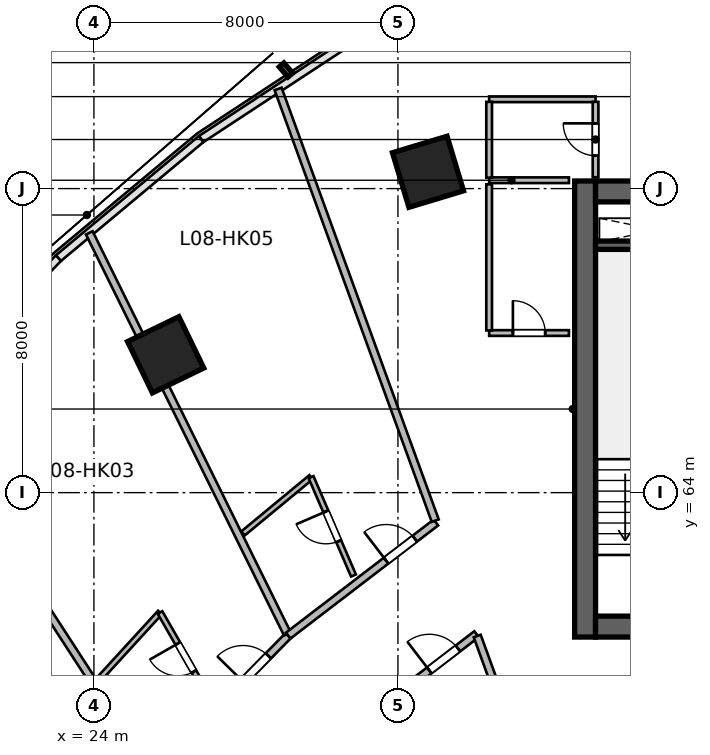
"""IFC4 building model, lengths in metres.
Left out: names, types, materials, properties, quantities, classifications, styles, units other than length and angle.
Written with IfcOpenShell. Run it as: python <this file> out.ifc"""

import sys

from ifc_helpers import new_model, si_unit, direction, frame, frame_2d, origin, origin_2d, place, context, subcontext, project, spatial, rectangle, extrude, source, transform, mapped, element, fill, save


model = new_model("IFC4")
c1 = context("Model", 3, precision=1e-05, world=origin(), true_north=direction((0.0, 1.0)))
c2 = subcontext(c1, "Body", "Model", "MODEL_VIEW")
j1 = project(units=[si_unit("LENGTHUNIT", "METRE"), si_unit("PLANEANGLEUNIT", "RADIAN")], contexts=[c1])
p1 = place(None, origin())
s1 = spatial("IfcSite", under=j1, at=p1, CompositionType="ELEMENT")
p2 = place(p1, origin())
s2 = spatial("IfcBuilding", under=s1, at=p2, CompositionType="ELEMENT")
p3 = place(p2, frame((0.0, 0.0, 42.6)))
s3 = spatial("IfcBuildingStorey", under=s2, at=p3, CompositionType="ELEMENT", Elevation=42.6)
m1 = source(origin(), c2, "Body", "SweptSolid", [
    extrude(rectangle(XDim=12.0, YDim=0.55, at=frame_2d((6.0, 0.0))), origin(), (0.0, 0.0, 1.0), 3.6),
])
p4 = place(p3, frame((36.925, 60.2, 0.0), z_axis=(0.0, 0.0, 1.0), x_axis=(0.0, 1.0, 0.0)))
e1 = element("IfcWall", 1, at=p4, inside=s3, PredefinedType="SHEAR", context=c2, shape_type="MappedRepresentation", body=[
    mapped(m1, transform((0.0, 0.0, 0.0), scale=1.0)),
])
m2 = source(origin(), c2, "Body", "SweptSolid", [
    extrude(rectangle(XDim=21.6, YDim=0.55, at=frame_2d((10.8, 0.0))), origin(), (0.0, 0.0, 1.0), 3.6),
])
p5 = place(p3, frame((37.2, 60.475, 0.0), z_axis=(0.0, 0.0, 1.0), x_axis=(1.0, 0.0, 0.0)))
e2 = element("IfcWall", 2, at=p5, inside=s3, PredefinedType="SHEAR", context=c2, shape_type="MappedRepresentation", body=[
    mapped(m2, transform((0.0, 0.0, 0.0), scale=1.0)),
])
p6 = place(p5, frame((1.1, 0.0, 0.0)))
e3 = element("IfcOpeningElement", 3, at=p6, cuts=e2, PredefinedType="OPENING", context=c2, shape_type="SweptSolid", body=[
    extrude(rectangle(XDim=1.15, YDim=2.15, at=frame_2d((0.575, 1.075))), frame((0.0, 0.285, 0.0), z_axis=(0.0, -1.0, 0.0), x_axis=(1.0, 0.0, 0.0)), (0.0, 0.0, 1.0), 0.57),
])
p7 = place(p5, frame((19.5, 0.0, 0.0)))
e4 = element("IfcOpeningElement", 4, at=p7, cuts=e2, PredefinedType="OPENING", context=c2, shape_type="SweptSolid", body=[
    extrude(rectangle(XDim=0.9, YDim=2.1, at=frame_2d((0.45, 1.05))), frame((0.0, 0.285, 0.0), z_axis=(0.0, -1.0, 0.0), x_axis=(1.0, 0.0, 0.0)), (0.0, 0.0, 1.0), 0.57),
])
p8 = place(p5, frame((12.02, 0.0, 0.0)))
e5 = element("IfcOpeningElement", 5, at=p8, cuts=e2, PredefinedType="OPENING", context=c2, shape_type="SweptSolid", body=[
    extrude(rectangle(XDim=1.6, YDim=2.15, at=frame_2d((0.8, 1.075))), frame((0.0, 0.285, 0.0), z_axis=(0.0, -1.0, 0.0), x_axis=(1.0, 0.0, 0.0)), (0.0, 0.0, 1.0), 0.57),
])
p9 = place(p3, frame((37.2, 71.925, 0.0), z_axis=(0.0, 0.0, 1.0), x_axis=(1.0, 0.0, 0.0)))
e6 = element("IfcWall", 6, at=p9, inside=s3, PredefinedType="SHEAR", context=c2, shape_type="MappedRepresentation", body=[
    mapped(m2, transform((0.0, 0.0, 0.0), scale=1.0)),
])
p10 = place(p9, frame((1.2, 0.0, 0.0)))
e7 = element("IfcOpeningElement", 7, at=p10, cuts=e6, PredefinedType="OPENING", context=c2, shape_type="SweptSolid", body=[
    extrude(rectangle(XDim=0.9, YDim=2.1, at=frame_2d((0.45, 1.05))), frame((0.0, 0.285, 0.0), z_axis=(0.0, -1.0, 0.0), x_axis=(1.0, 0.0, 0.0)), (0.0, 0.0, 1.0), 0.57),
])
p11 = place(p9, frame((14.7, 0.0, 0.0)))
e8 = element("IfcOpeningElement", 8, at=p11, cuts=e6, PredefinedType="OPENING", context=c2, shape_type="SweptSolid", body=[
    extrude(rectangle(XDim=1.2, YDim=2.15, at=frame_2d((0.6, 1.075))), frame((0.0, 0.285, 0.0), z_axis=(0.0, -1.0, 0.0), x_axis=(1.0, 0.0, 0.0)), (0.0, 0.0, 1.0), 0.57),
])
p12 = place(p9, frame((4.15, 0.0, 0.0)))
e9 = element("IfcOpeningElement", 9, at=p12, cuts=e6, PredefinedType="OPENING", context=c2, shape_type="SweptSolid", body=[
    extrude(rectangle(XDim=1.3, YDim=2.15, at=frame_2d((0.65, 1.075))), frame((0.0, 0.285, 0.0), z_axis=(0.0, -1.0, 0.0), x_axis=(1.0, 0.0, 0.0)), (0.0, 0.0, 1.0), 0.57),
])
p13 = place(p9, frame((7.25, 0.0, 0.0)))
e10 = element("IfcOpeningElement", 10, at=p13, cuts=e6, PredefinedType="OPENING", context=c2, shape_type="SweptSolid", body=[
    extrude(rectangle(XDim=0.9, YDim=2.1, at=frame_2d((0.45, 1.05))), frame((0.0, 0.285, 0.0), z_axis=(0.0, -1.0, 0.0), x_axis=(1.0, 0.0, 0.0)), (0.0, 0.0, 1.0), 0.57),
])
p14 = place(p9, frame((10.95, 0.0, 0.0)))
e11 = element("IfcOpeningElement", 11, at=p14, cuts=e6, PredefinedType="OPENING", context=c2, shape_type="SweptSolid", body=[
    extrude(rectangle(XDim=0.9, YDim=2.1, at=frame_2d((0.45, 1.05))), frame((0.0, 0.285, 0.0), z_axis=(0.0, -1.0, 0.0), x_axis=(1.0, 0.0, 0.0)), (0.0, 0.0, 1.0), 0.57),
])
m3 = source(origin(), c2, "Body", "SweptSolid", [
    extrude(rectangle(XDim=3.27, YDim=0.22, at=frame_2d((1.635, 0.0))), origin(), (0.0, 0.0, 1.0), 3.6),
])
p15 = place(p3, frame((37.2, 70.51, 0.0), z_axis=(0.0, 0.0, 1.0), x_axis=(1.0, 0.0, 0.0)))
e12 = element("IfcWall", 12, at=p15, inside=s3, PredefinedType="SHEAR", context=c2, shape_type="MappedRepresentation", body=[
    mapped(m3, transform((0.0, 0.0, 0.0), scale=1.0)),
])
m4 = source(origin(), c2, "Body", "SweptSolid", [
    extrude(rectangle(XDim=1.5, YDim=1.5, at=origin_2d()), origin(), (0.0, 0.0, 1.0), 3.6),
])
for number, where, z_axis, x_axis in (
    (13, (25.888, 67.627, 0.0), (0.0, 0.0, 1.0), (-0.436, 0.9, 0.0)),
    (14, (32.791, 72.442, 0.0), (0.0, 0.0, 1.0), (-0.289, 0.957, 0.0)),
):
    element("IfcColumn", number, at=place(p3, frame(where, z_axis=z_axis, x_axis=x_axis)), inside=s3, PredefinedType="COLUMN", context=c2, shape_type="MappedRepresentation", body=[
        mapped(m4, transform((0.0, 0.0, 0.0), scale=1.0)),
    ])
m5 = source(origin(), c2, "Body", "SweptSolid", [
    extrude(rectangle(XDim=2.1, YDim=0.15, at=frame_2d((1.05, 0.0))), origin(), (0.0, 0.0, 1.0), 3.36),
])
p16 = place(p3, frame((34.4, 72.22, 0.0), z_axis=(0.0, 0.0, 1.0), x_axis=(1.0, 0.0, 0.0)))
e15 = element("IfcWall", 15, at=p16, inside=s3, PredefinedType="PARTITIONING", context=c2, shape_type="MappedRepresentation", body=[
    mapped(m5, transform((0.0, 0.0, 0.0), scale=1.0)),
])
m6 = source(origin(), c2, "Body", "SweptSolid", [
    extrude(rectangle(XDim=2.8, YDim=0.15, at=frame_2d((1.4, 0.0))), origin(), (0.0, 0.0, 1.0), 3.36),
])
p17 = place(p3, frame((34.4, 74.35, 0.0), z_axis=(0.0, 0.0, 1.0), x_axis=(1.0, 0.0, 0.0)))
e16 = element("IfcWall", 16, at=p17, inside=s3, PredefinedType="PARTITIONING", context=c2, shape_type="MappedRepresentation", body=[
    mapped(m6, transform((0.0, 0.0, 0.0), scale=1.0)),
])
m7 = source(origin(), c2, "Body", "SweptSolid", [
    extrude(rectangle(XDim=1.995, YDim=0.15, at=frame_2d((0.998, 0.0))), origin(), (0.0, 0.0, 1.0), 3.36),
])
p18 = place(p3, frame((34.4, 72.288, 0.0), z_axis=(0.0, 0.0, 1.0), x_axis=(0.0, 1.0, 0.0)))
e17 = element("IfcWall", 17, at=p18, inside=s3, PredefinedType="PARTITIONING", context=c2, shape_type="MappedRepresentation", body=[
    mapped(m7, transform((0.0, 0.0, 0.0), scale=1.0)),
])
m8 = source(origin(), c2, "Body", "SweptSolid", [
    extrude(rectangle(XDim=1.982, YDim=0.15, at=frame_2d((0.991, 0.0))), origin(), (0.0, 0.0, 1.0), 3.36),
])
p19 = place(p3, frame((37.2, 72.3, 0.0), z_axis=(0.0, 0.0, 1.0), x_axis=(0.0, 1.0, 0.0)))
e18 = element("IfcWall", 18, at=p19, inside=s3, PredefinedType="PARTITIONING", context=c2, shape_type="MappedRepresentation", body=[
    mapped(m8, transform((0.0, 0.0, 0.0), scale=1.0)),
])
p20 = place(p19, frame((0.566, 0.0, 0.0)))
e19 = element("IfcOpeningElement", 19, at=p20, cuts=e18, PredefinedType="OPENING", context=c2, shape_type="SweptSolid", body=[
    extrude(rectangle(XDim=0.85, YDim=2.1, at=frame_2d((0.425, 1.05))), frame((0.0, 0.085, 0.0), z_axis=(0.0, -1.0, 0.0), x_axis=(1.0, 0.0, 0.0)), (0.0, 0.0, 1.0), 0.17),
])
p21 = place(p3, frame((34.4, 68.2, 0.0), z_axis=(0.0, 0.0, 1.0), x_axis=(1.0, 0.0, 0.0)))
e20 = element("IfcWall", 20, at=p21, inside=s3, PredefinedType="PARTITIONING", context=c2, shape_type="MappedRepresentation", body=[
    mapped(m5, transform((0.0, 0.0, 0.0), scale=1.0)),
])
p22 = place(p21, frame((0.625, 0.0, 0.0)))
e21 = element("IfcOpeningElement", 21, at=p22, cuts=e20, PredefinedType="OPENING", context=c2, shape_type="SweptSolid", body=[
    extrude(rectangle(XDim=0.85, YDim=2.1, at=frame_2d((0.425, 1.05))), frame((0.0, 0.085, 0.0), z_axis=(0.0, -1.0, 0.0), x_axis=(1.0, 0.0, 0.0)), (0.0, 0.0, 1.0), 0.17),
])
m9 = source(origin(), c2, "Body", "SweptSolid", [
    extrude(rectangle(XDim=3.845, YDim=0.15, at=frame_2d((1.922, 0.0))), origin(), (0.0, 0.0, 1.0), 3.36),
])
p23 = place(p3, frame((34.4, 68.268, 0.0), z_axis=(0.0, 0.0, 1.0), x_axis=(0.0, 1.0, 0.0)))
e22 = element("IfcWall", 22, at=p23, inside=s3, PredefinedType="PARTITIONING", context=c2, shape_type="MappedRepresentation", body=[
    mapped(m9, transform((0.0, 0.0, 0.0), scale=1.0)),
])
m10 = source(origin(), c2, "Body", "SweptSolid", [
    extrude(rectangle(XDim=11.403, YDim=0.195, at=frame_2d((5.701, 0.0))), origin(), (0.0, 0.0, 1.0), 3.36),
])
p24 = place(p3, frame((25.523, 56.647, 0.0), z_axis=(0.0, 0.0, 1.0), x_axis=(-0.544246090008, 0.838925618581, 0.0)))
e23 = element("IfcWall", 23, at=p24, inside=s3, PredefinedType="PARTITIONING", context=c2, shape_type="MappedRepresentation", body=[
    mapped(m10, transform((0.0, 0.0, 0.0), scale=1.0)),
])
m11 = source(origin(), c2, "Body", "SweptSolid", [
    extrude(rectangle(XDim=5.087, YDim=0.195, at=frame_2d((2.543, 0.0))), origin(), (0.0, 0.0, 1.0), 3.36),
])
p25 = place(p3, frame((25.55, 56.607, 0.0), z_axis=(0.0, 0.0, 1.0), x_axis=(0.700428330775, 0.7137227427, 0.0)))
e24 = element("IfcWall", 24, at=p25, inside=s3, PredefinedType="PARTITIONING", context=c2, shape_type="MappedRepresentation", body=[
    mapped(m11, transform((0.0, 0.0, 0.0), scale=1.0)),
])
p26 = place(p25, frame((3.391, 0.0, 0.0)))
e25 = element("IfcOpeningElement", 25, at=p26, cuts=e24, PredefinedType="OPENING", context=c2, shape_type="SweptSolid", body=[
    extrude(rectangle(XDim=0.95, YDim=2.15, at=frame_2d((0.475, 1.075))), frame((0.0, 0.107, 0.0), z_axis=(0.0, -1.0, 0.0), x_axis=(1.0, 0.0, 0.0)), (0.0, 0.0, 1.0), 0.215),
])
m12 = source(origin(), c2, "Body", "SweptSolid", [
    extrude(rectangle(XDim=11.77, YDim=0.195, at=frame_2d((5.885, 0.0))), origin(), (0.0, 0.0, 1.0), 3.36),
])
p27 = place(p3, frame((29.091, 60.282, 0.0), z_axis=(0.0, 0.0, 1.0), x_axis=(-0.44286060326, 0.896590478468, 0.0)))
e26 = element("IfcWall", 26, at=p27, inside=s3, PredefinedType="PARTITIONING", context=c2, shape_type="MappedRepresentation", body=[
    mapped(m12, transform((0.0, 0.0, 0.0), scale=1.0)),
])
m13 = source(origin(), c2, "Body", "SweptSolid", [
    extrude(rectangle(XDim=2.416, YDim=0.14, at=frame_2d((1.208, 0.0))), origin(), (0.0, 0.0, 1.0), 3.36),
])
p28 = place(p3, frame((24.108, 59.064, 0.0), z_axis=(0.0, 0.0, 1.0), x_axis=(0.675399637907, 0.737451916476, 0.0)))
e27 = element("IfcWall", 27, at=p28, inside=s3, PredefinedType="PARTITIONING", context=c2, shape_type="MappedRepresentation", body=[
    mapped(m13, transform((0.0, 0.0, 0.0), scale=1.0)),
])
m14 = source(origin(), c2, "Body", "SweptSolid", [
    extrude(rectangle(XDim=2.732, YDim=0.14, at=frame_2d((1.366, 0.0))), origin(), (0.0, 0.0, 1.0), 3.36),
])
p29 = place(p3, frame((27.098, 58.476, 0.0), z_axis=(0.0, 0.0, 1.0), x_axis=(-0.497254966372, 0.867604459658, 0.0)))
e28 = element("IfcWall", 28, at=p29, inside=s3, PredefinedType="PARTITIONING", context=c2, shape_type="MappedRepresentation", body=[
    mapped(m14, transform((0.0, 0.0, 0.0), scale=1.0)),
])
p30 = place(p29, frame((0.941, 0.0, 0.0)))
e29 = element("IfcOpeningElement", 29, at=p30, cuts=e28, PredefinedType="OPENING", context=c2, shape_type="SweptSolid", body=[
    extrude(rectangle(XDim=0.85, YDim=2.05, at=frame_2d((0.425, 1.025))), frame((0.0, 0.08, 0.0), z_axis=(0.0, -1.0, 0.0), x_axis=(1.0, 0.0, 0.0)), (0.0, 0.0, 1.0), 0.16),
])
m15 = source(origin(), c2, "Body", "SweptSolid", [
    extrude(rectangle(XDim=4.895, YDim=0.195, at=frame_2d((2.447, 0.0))), origin(), (0.0, 0.0, 1.0), 3.36),
])
p31 = place(p3, frame((29.113, 60.238, 0.0), z_axis=(0.0, 0.0, 1.0), x_axis=(0.793896075849, 0.608053468661, 0.0)))
e30 = element("IfcWall", 30, at=p31, inside=s3, PredefinedType="PARTITIONING", context=c2, shape_type="MappedRepresentation", body=[
    mapped(m15, transform((0.0, 0.0, 0.0), scale=1.0)),
])
p32 = place(p31, frame((3.245, 0.0, 0.0)))
e31 = element("IfcOpeningElement", 31, at=p32, cuts=e30, PredefinedType="OPENING", context=c2, shape_type="SweptSolid", body=[
    extrude(rectangle(XDim=0.95, YDim=2.15, at=frame_2d((0.475, 1.075))), frame((0.0, 0.107, 0.0), z_axis=(0.0, -1.0, 0.0), x_axis=(1.0, 0.0, 0.0)), (0.0, 0.0, 1.0), 0.215),
])
m16 = source(origin(), c2, "Body", "SweptSolid", [
    extrude(rectangle(XDim=12.088, YDim=0.195, at=frame_2d((6.044, 0.0))), origin(), (0.0, 0.0, 1.0), 3.36),
])
p33 = place(p3, frame((32.981, 63.262, 0.0), z_axis=(0.0, 0.0, 1.0), x_axis=(-0.34203007529, 0.939689005787, 0.0)))
e32 = element("IfcWall", 32, at=p33, inside=s3, PredefinedType="PARTITIONING", context=c2, shape_type="MappedRepresentation", body=[
    mapped(m16, transform((0.0, 0.0, 0.0), scale=1.0)),
])
m17 = source(origin(), c2, "Body", "SweptSolid", [
    extrude(rectangle(XDim=2.324, YDim=0.14, at=frame_2d((1.162, 0.0))), origin(), (0.0, 0.0, 1.0), 3.36),
])
p34 = place(p3, frame((27.923, 62.926, 0.0), z_axis=(0.0, 0.0, 1.0), x_axis=(0.770746444956, 0.637141991701, 0.0)))
e33 = element("IfcWall", 33, at=p34, inside=s3, PredefinedType="PARTITIONING", context=c2, shape_type="MappedRepresentation", body=[
    mapped(m17, transform((0.0, 0.0, 0.0), scale=1.0)),
])
m18 = source(origin(), c2, "Body", "SweptSolid", [
    extrude(rectangle(XDim=2.818, YDim=0.14, at=frame_2d((1.409, 0.0))), origin(), (0.0, 0.0, 1.0), 3.36),
])
p35 = place(p3, frame((30.83, 61.819, 0.0), z_axis=(0.0, 0.0, 1.0), x_axis=(-0.395894859341, 0.918295845764, 0.0)))
e34 = element("IfcWall", 34, at=p35, inside=s3, PredefinedType="PARTITIONING", context=c2, shape_type="MappedRepresentation", body=[
    mapped(m18, transform((0.0, 0.0, 0.0), scale=1.0)),
])
p36 = place(p35, frame((0.984, 0.0, 0.0)))
e35 = element("IfcOpeningElement", 35, at=p36, cuts=e34, PredefinedType="OPENING", context=c2, shape_type="SweptSolid", body=[
    extrude(rectangle(XDim=0.85, YDim=2.05, at=frame_2d((0.425, 1.025))), frame((0.0, 0.08, 0.0), z_axis=(0.0, -1.0, 0.0), x_axis=(1.0, 0.0, 0.0)), (0.0, 0.0, 1.0), 0.16),
])
m19 = source(origin(), c2, "Body", "SweptSolid", [
    extrude(rectangle(XDim=4.546, YDim=0.195, at=frame_2d((2.273, 0.0))), origin(), (0.0, 0.0, 1.0), 3.36),
])
p37 = place(p3, frame((30.459, 57.511, 0.0), z_axis=(0.0, 0.0, 1.0), x_axis=(0.793907931297, 0.608037989457, 0.0)))
e36 = element("IfcWall", 36, at=p37, inside=s3, PredefinedType="PARTITIONING", context=c2, shape_type="MappedRepresentation", body=[
    mapped(m19, transform((0.0, 0.0, 0.0), scale=1.0)),
])
p38 = place(p37, frame((2.98, 0.0, 0.0)))
e37 = element("IfcOpeningElement", 37, at=p38, cuts=e36, PredefinedType="OPENING", context=c2, shape_type="SweptSolid", body=[
    extrude(rectangle(XDim=0.95, YDim=2.15, at=frame_2d((0.475, 1.075))), frame((0.0, 0.107, 0.0), z_axis=(0.0, -1.0, 0.0), x_axis=(1.0, 0.0, 0.0)), (0.0, 0.0, 1.0), 0.215),
])
m20 = source(origin(), c2, "Body", "SweptSolid", [
    extrude(rectangle(XDim=12.196, YDim=0.195, at=frame_2d((6.098, 0.0))), origin(), (0.0, 0.0, 1.0), 3.36),
])
p39 = place(p3, frame((38.258, 48.766, 0.0), z_axis=(0.0, 0.0, 1.0), x_axis=(-0.342022711534, 0.939691686031, 0.0)))
e38 = element("IfcWall", 38, at=p39, inside=s3, PredefinedType="PARTITIONING", context=c2, shape_type="MappedRepresentation", body=[
    mapped(m20, transform((0.0, 0.0, 0.0), scale=1.0)),
])
m21 = source(origin(), c2, "Body", "SweptSolid", [
    extrude(rectangle(XDim=0.85, YDim=2.1, at=frame_2d((0.425, 1.05))), frame((0.0, 0.025, 0.0), z_axis=(0.0, -1.0, 0.0), x_axis=(1.0, 0.0, 0.0)), (0.0, 0.0, 1.0), 0.05),
])
p40 = place(p20, origin())
e39 = element("IfcDoor", 39, at=p40, inside=s3, OperationType="SINGLE_SWING_RIGHT", PredefinedType="DOOR", context=c2, shape_type="MappedRepresentation", body=[
    mapped(m21, transform((0.0, 0.0, 0.0), scale=1.0)),
])
fill(e19, e39)
p41 = place(p22, origin())
e40 = element("IfcDoor", 40, at=p41, inside=s3, OperationType="SINGLE_SWING_LEFT", PredefinedType="DOOR", context=c2, shape_type="MappedRepresentation", body=[
    mapped(m21, transform((0.0, 0.0, 0.0), scale=1.0)),
])
fill(e21, e40)
m22 = source(origin(), c2, "Body", "SweptSolid", [
    extrude(rectangle(XDim=0.95, YDim=2.15, at=frame_2d((0.475, 1.075))), frame((0.0, 0.025, 0.0), z_axis=(0.0, -1.0, 0.0), x_axis=(1.0, 0.0, 0.0)), (0.0, 0.0, 1.0), 0.05),
])
p42 = place(p26, origin())
e41 = element("IfcDoor", 41, at=p42, inside=s3, OperationType="SINGLE_SWING_LEFT", PredefinedType="DOOR", context=c2, shape_type="MappedRepresentation", body=[
    mapped(m22, transform((0.0, 0.0, 0.0), scale=1.0)),
])
fill(e25, e41)
m23 = source(origin(), c2, "Body", "SweptSolid", [
    extrude(rectangle(XDim=0.85, YDim=2.05, at=frame_2d((0.425, 1.025))), frame((0.0, 0.025, 0.0), z_axis=(0.0, -1.0, 0.0), x_axis=(1.0, 0.0, 0.0)), (0.0, 0.0, 1.0), 0.05),
])
p43 = place(p30, origin())
e42 = element("IfcDoor", 42, at=p43, inside=s3, OperationType="SINGLE_SWING_RIGHT", PredefinedType="DOOR", context=c2, shape_type="MappedRepresentation", body=[
    mapped(m23, transform((0.0, 0.0, 0.0), scale=1.0)),
])
fill(e29, e42)
p44 = place(p32, origin())
e43 = element("IfcDoor", 43, at=p44, inside=s3, OperationType="SINGLE_SWING_LEFT", PredefinedType="DOOR", context=c2, shape_type="MappedRepresentation", body=[
    mapped(m22, transform((0.0, 0.0, 0.0), scale=1.0)),
])
fill(e31, e43)
p45 = place(p36, origin())
e44 = element("IfcDoor", 44, at=p45, inside=s3, OperationType="SINGLE_SWING_RIGHT", PredefinedType="DOOR", context=c2, shape_type="MappedRepresentation", body=[
    mapped(m23, transform((0.0, 0.0, 0.0), scale=1.0)),
])
fill(e35, e44)
p46 = place(p38, origin())
e45 = element("IfcDoor", 45, at=p46, inside=s3, OperationType="SINGLE_SWING_LEFT", PredefinedType="DOOR", context=c2, shape_type="MappedRepresentation", body=[
    mapped(m22, transform((0.0, 0.0, 0.0), scale=1.0)),
])
fill(e37, e45)
save(model, sys.argv[1])
